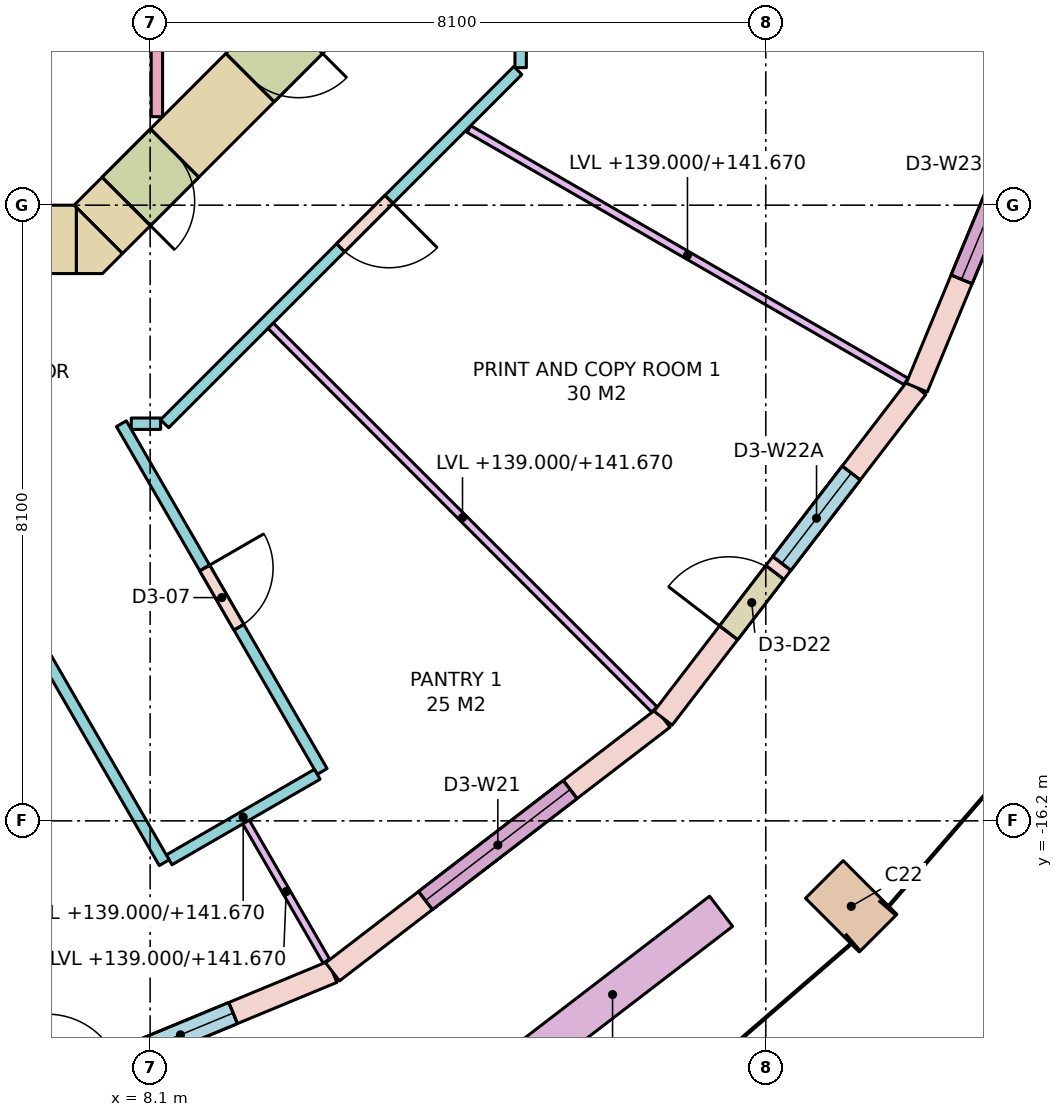
"""IFC4 building model, lengths in metres.
Left out: names, types, materials, properties, quantities, classifications, styles, units other than length and angle.
Written with IfcOpenShell. Run it as: python <this file> out.ifc"""

import sys

from ifc_helpers import new_model, si_unit, direction, frame, frame_2d, origin, origin_2d, place, context, subcontext, project, spatial, polyline, rectangle, outline, extrude, element, fill, save


model = new_model("IFC4")
c1 = context("Model", 3, precision=1e-05, world=origin(), true_north=direction((0.0, 1.0)))
c2 = subcontext(c1, "Body", "Model", "MODEL_VIEW")
j1 = project(units=[si_unit("LENGTHUNIT", "METRE"), si_unit("PLANEANGLEUNIT", "RADIAN")], contexts=[c1])
p1 = place(None, origin())
s1 = spatial("IfcSite", under=j1, at=p1, CompositionType="ELEMENT")
p2 = place(p1, origin())
s2 = spatial("IfcBuilding", under=s1, at=p2, CompositionType="ELEMENT")
p3 = place(p2, frame((0.0, 0.0, 139.0)))
s3 = spatial("IfcBuildingStorey", under=s2, at=p3, CompositionType="ELEMENT", Elevation=139.0)
p4 = place(p3, frame((17.324, -17.324, 0.0), z_axis=(0.0, 0.0, 1.0), x_axis=(0.707106781187, 0.707106781187, 0.0)))
e1 = element("IfcColumn", 1, at=p4, inside=s3, PredefinedType="COLUMN", context=c2, shape_type="SweptSolid", body=[
    extrude(rectangle(XDim=0.7, YDim=1.0, at=origin_2d()), origin(), (0.0, 0.0, 1.0), 3.8),
])
p5 = place(p3, frame((-7.13, -8.55, -0.28), z_axis=(0.0, 0.0, 1.0), x_axis=(1.0, 0.0, 0.0)))
e2 = element("IfcWall", 2, at=p5, inside=s3, PredefinedType="SHEAR", context=c2, shape_type="SweptSolid", body=[
    extrude(rectangle(XDim=14.26, YDim=0.9, at=frame_2d((7.13, 0.0))), origin(), (0.0, 0.0, 1.0), 3.8),
])
p6 = place(p5, frame((8.08, 0.0, 0.28)))
e3 = element("IfcOpeningElement", 3, at=p6, cuts=e2, PredefinedType="OPENING", context=c2, shape_type="SweptSolid", body=[
    extrude(rectangle(XDim=0.7, YDim=2.1, at=frame_2d((0.35, 1.05))), frame((0.0, 0.46, 0.0), z_axis=(0.0, -1.0, 0.0), x_axis=(1.0, 0.0, 0.0)), (0.0, 0.0, 1.0), 0.92),
])
p7 = place(p5, frame((5.58, 0.0, 0.28)))
e4 = element("IfcOpeningElement", 4, at=p7, cuts=e2, PredefinedType="OPENING", context=c2, shape_type="SweptSolid", body=[
    extrude(rectangle(XDim=0.85, YDim=2.1, at=frame_2d((0.425, 1.05))), frame((0.0, 0.46, 0.0), z_axis=(0.0, -1.0, 0.0), x_axis=(1.0, 0.0, 0.0)), (0.0, 0.0, 1.0), 0.92),
])
p8 = place(p5, frame((6.88, 0.0, 0.28)))
e5 = element("IfcOpeningElement", 5, at=p8, cuts=e2, PredefinedType="OPENING", context=c2, shape_type="SweptSolid", body=[
    extrude(rectangle(XDim=0.85, YDim=2.1, at=frame_2d((0.425, 1.05))), frame((0.0, 0.46, 0.0), z_axis=(0.0, -1.0, 0.0), x_axis=(1.0, 0.0, 0.0)), (0.0, 0.0, 1.0), 0.92),
])
p9 = place(p5, frame((9.445, 0.0, 0.28)))
e6 = element("IfcOpeningElement", 6, at=p9, cuts=e2, PredefinedType="OPENING", context=c2, shape_type="SweptSolid", body=[
    extrude(rectangle(XDim=0.9, YDim=2.1, at=frame_2d((0.45, 1.05))), frame((0.0, 0.46, 0.0), z_axis=(0.0, -1.0, 0.0), x_axis=(1.0, 0.0, 0.0)), (0.0, 0.0, 1.0), 0.92),
])
p10 = place(p5, frame((11.431, 0.0, 0.28)))
e7 = element("IfcOpeningElement", 7, at=p10, cuts=e2, PredefinedType="OPENING", context=c2, shape_type="SweptSolid", body=[
    extrude(rectangle(XDim=0.9, YDim=2.1, at=frame_2d((0.45, 1.05))), frame((0.0, 0.46, 0.0), z_axis=(0.0, -1.0, 0.0), x_axis=(1.0, 0.0, 0.0)), (0.0, 0.0, 1.0), 0.92),
])
p11 = place(p3, frame((10.418, -5.418, -0.28), z_axis=(0.0, 0.0, 1.0), x_axis=(-0.707106781187, -0.707106781187, 0.0)))
e8 = element("IfcWall", 8, at=p11, inside=s3, PredefinedType="SHEAR", context=c2, shape_type="SweptSolid", body=[
    extrude(rectangle(XDim=4.243, YDim=0.9, at=frame_2d((2.121, 0.0))), origin(), (0.0, 0.0, 1.0), 3.8),
])
p12 = place(p11, frame((2.823, 0.0, 0.28)))
e9 = element("IfcOpeningElement", 9, at=p12, cuts=e8, PredefinedType="OPENING", context=c2, shape_type="SweptSolid", body=[
    extrude(rectangle(XDim=0.9, YDim=2.1, at=frame_2d((0.45, 1.05))), frame((0.0, 0.46, 0.0), z_axis=(0.0, -1.0, 0.0), x_axis=(1.0, 0.0, 0.0)), (0.0, 0.0, 1.0), 0.92),
])
p13 = place(p11, frame((0.52, 0.0, 0.28)))
e10 = element("IfcOpeningElement", 10, at=p13, cuts=e8, PredefinedType="OPENING", context=c2, shape_type="SweptSolid", body=[
    extrude(rectangle(XDim=0.9, YDim=2.1, at=frame_2d((0.45, 1.05))), frame((0.0, 0.46, 0.0), z_axis=(0.0, -1.0, 0.0), x_axis=(1.0, 0.0, 0.0)), (0.0, 0.0, 1.0), 0.92),
])
p14 = place(p3, frame((0.0, 0.0, -0.28)))
e11 = element("IfcWall", 11, at=p14, inside=s3, PredefinedType="SHEAR", context=c2, shape_type="SweptSolid", body=[
    extrude(outline(polyline([(7.473, -9.0), (7.13, -9.0), (7.13, -8.13), (7.736, -8.736), (7.473, -9.0)])), origin(), (0.0, 0.0, 1.0), 3.8),
])
p15 = place(p3, frame((5.435, -20.284, 0.0), z_axis=(0.0, 0.0, 1.0), x_axis=(0.923877333662, 0.382688740813, 0.0)))
e12 = element("IfcWall", 12, at=p15, inside=s3, PredefinedType="STANDARD", context=c2, shape_type="SweptSolid", body=[
    extrude(rectangle(XDim=5.482, YDim=0.3, at=frame_2d((2.741, 0.0))), origin(), (0.0, 0.0, 1.0), 3.52),
])
p16 = place(p15, frame((1.416, 0.0, 0.0)))
e13 = element("IfcOpeningElement", 13, at=p16, cuts=e12, PredefinedType="OPENING", context=c2, shape_type="SweptSolid", body=[
    extrude(rectangle(XDim=1.0, YDim=2.4, at=frame_2d((0.5, 1.2))), frame((0.0, 0.16, 0.0), z_axis=(0.0, -1.0, 0.0), x_axis=(1.0, 0.0, 0.0)), (0.0, 0.0, 1.0), 0.32),
])
p17 = place(p15, frame((2.566, 0.0, 0.8)))
e14 = element("IfcOpeningElement", 14, at=p17, cuts=e12, PredefinedType="OPENING", context=c2, shape_type="SweptSolid", body=[
    extrude(rectangle(XDim=1.5, YDim=2.5, at=frame_2d((0.75, 1.25))), frame((0.0, 0.16, 0.0), z_axis=(0.0, -1.0, 0.0), x_axis=(1.0, 0.0, 0.0)), (0.0, 0.0, 1.0), 0.32),
])
p18 = place(p3, frame((10.5, -18.187, 0.0), z_axis=(0.0, 0.0, 1.0), x_axis=(0.793335336593, 0.608784891166, 0.0)))
e15 = element("IfcWall", 15, at=p18, inside=s3, PredefinedType="STANDARD", context=c2, shape_type="SweptSolid", body=[
    extrude(rectangle(XDim=5.482, YDim=0.3, at=frame_2d((2.741, 0.0))), origin(), (0.0, 0.0, 1.0), 3.52),
])
p19 = place(p18, frame((1.541, 0.0, 0.8)))
e16 = element("IfcOpeningElement", 16, at=p19, cuts=e15, PredefinedType="OPENING", context=c2, shape_type="SweptSolid", body=[
    extrude(rectangle(XDim=2.4, YDim=2.5, at=frame_2d((1.2, 1.25))), frame((0.0, 0.16, 0.0), z_axis=(0.0, -1.0, 0.0), x_axis=(1.0, 0.0, 0.0)), (0.0, 0.0, 1.0), 0.32),
])
p20 = place(p3, frame((14.849, -14.849, 0.0), z_axis=(0.0, 0.0, 1.0), x_axis=(0.608784891166, 0.793335336593, 0.0)))
e17 = element("IfcWall", 17, at=p20, inside=s3, PredefinedType="STANDARD", context=c2, shape_type="SweptSolid", body=[
    extrude(rectangle(XDim=5.482, YDim=0.3, at=frame_2d((2.741, 0.0))), origin(), (0.0, 0.0, 1.0), 3.52),
])
p21 = place(p20, frame((1.416, 0.0, 0.0)))
e18 = element("IfcOpeningElement", 18, at=p21, cuts=e17, PredefinedType="OPENING", context=c2, shape_type="SweptSolid", body=[
    extrude(rectangle(XDim=1.0, YDim=2.4, at=frame_2d((0.5, 1.2))), frame((0.0, 0.16, 0.0), z_axis=(0.0, -1.0, 0.0), x_axis=(1.0, 0.0, 0.0)), (0.0, 0.0, 1.0), 0.32),
])
p22 = place(p20, frame((2.566, 0.0, 0.8)))
e19 = element("IfcOpeningElement", 19, at=p22, cuts=e17, PredefinedType="OPENING", context=c2, shape_type="SweptSolid", body=[
    extrude(rectangle(XDim=1.5, YDim=2.5, at=frame_2d((0.75, 1.25))), frame((0.0, 0.16, 0.0), z_axis=(0.0, -1.0, 0.0), x_axis=(1.0, 0.0, 0.0)), (0.0, 0.0, 1.0), 0.32),
])
p23 = place(p3, frame((18.187, -10.5, 0.0), z_axis=(0.0, 0.0, 1.0), x_axis=(0.382688740813, 0.923877333662, 0.0)))
e20 = element("IfcWall", 20, at=p23, inside=s3, PredefinedType="STANDARD", context=c2, shape_type="SweptSolid", body=[
    extrude(rectangle(XDim=5.482, YDim=0.3, at=frame_2d((2.741, 0.0))), origin(), (0.0, 0.0, 1.0), 3.52),
])
p24 = place(p23, frame((1.541, 0.0, 0.8)))
e21 = element("IfcOpeningElement", 21, at=p24, cuts=e20, PredefinedType="OPENING", context=c2, shape_type="SweptSolid", body=[
    extrude(rectangle(XDim=2.4, YDim=2.5, at=frame_2d((1.2, 1.25))), frame((0.0, 0.16, 0.0), z_axis=(0.0, -1.0, 0.0), x_axis=(1.0, 0.0, 0.0)), (0.0, 0.0, 1.0), 0.32),
])
p25 = place(p3, frame((12.756, -19.581, 0.0), z_axis=(0.0, 0.0, 1.0), x_axis=(0.793384730612, 0.608720518162, 0.0)))
e22 = element("IfcWall", 22, at=p25, inside=s3, PredefinedType="PARAPET", context=c2, shape_type="SweptSolid", body=[
    extrude(rectangle(XDim=3.6, YDim=0.5, at=frame_2d((1.8, 0.0))), origin(), (0.0, 0.0, 1.0), 0.9),
])
p26 = place(p3, frame((8.189, -6.936, 0.0), z_axis=(0.0, 0.0, 1.0), x_axis=(0.0, 1.0, 0.0)))
e23 = element("IfcWall", 23, at=p26, inside=s3, PredefinedType="PARTITIONING", context=c2, shape_type="SweptSolid", body=[
    extrude(rectangle(XDim=2.436, YDim=0.15, at=frame_2d((1.218, 0.0))), origin(), (0.0, 0.0, 1.0), 3.52),
])
p27 = place(p3, frame((12.975, 6.105, 0.0), z_axis=(0.0, 0.0, 1.0), x_axis=(0.0, -1.0, 0.0)))
e24 = element("IfcWall", 24, at=p27, inside=s3, PredefinedType="PARTITIONING", context=c2, shape_type="SweptSolid", body=[
    extrude(rectangle(XDim=12.396, YDim=0.15, at=frame_2d((6.198, 0.0))), origin(), (0.0, 0.0, 1.0), 2.67),
])
p28 = place(p27, frame((5.298, 0.0, 0.0)))
e25 = element("IfcOpeningElement", 25, at=p28, cuts=e24, PredefinedType="OPENING", context=c2, shape_type="SweptSolid", body=[
    extrude(rectangle(XDim=1.8, YDim=2.1, at=frame_2d((0.9, 1.05))), frame((0.0, 0.085, 0.0), z_axis=(0.0, -1.0, 0.0), x_axis=(1.0, 0.0, 0.0)), (0.0, 0.0, 1.0), 0.17),
])
p29 = place(p3, frame((12.938, -6.328, 0.0), z_axis=(0.0, 0.0, 1.0), x_axis=(-0.707088206597, -0.707125355289, 0.0)))
e26 = element("IfcWall", 26, at=p29, inside=s3, PredefinedType="PARTITIONING", context=c2, shape_type="SweptSolid", body=[
    extrude(rectangle(XDim=6.572, YDim=0.15, at=frame_2d((3.286, 0.0))), origin(), (0.0, 0.0, 1.0), 2.67),
])
p30 = place(p29, frame((2.398, 0.0, 0.0)))
e27 = element("IfcOpeningElement", 27, at=p30, cuts=e26, PredefinedType="OPENING", context=c2, shape_type="SweptSolid", body=[
    extrude(rectangle(XDim=0.9, YDim=2.1, at=frame_2d((0.45, 1.05))), frame((0.0, 0.085, 0.0), z_axis=(0.0, -1.0, 0.0), x_axis=(1.0, 0.0, 0.0)), (0.0, 0.0, 1.0), 0.17),
])
p31 = place(p3, frame((8.238, -10.975, 0.0), z_axis=(0.0, 0.0, 1.0), x_axis=(-1.0, 0.0, 0.0)))
e28 = element("IfcWall", 28, at=p31, inside=s3, PredefinedType="PARTITIONING", context=c2, shape_type="SweptSolid", body=[
    extrude(rectangle(XDim=0.386, YDim=0.15, at=frame_2d((0.193, 0.0))), origin(), (0.0, 0.0, 1.0), 3.52),
])
p32 = place(p3, frame((7.722, -10.975, 0.0), z_axis=(0.0, 0.0, 1.0), x_axis=(0.499981143329, -0.866036290415, 0.0)))
e29 = element("IfcWall", 29, at=p32, inside=s3, PredefinedType="PARTITIONING", context=c2, shape_type="SweptSolid", body=[
    extrude(rectangle(XDim=5.283, YDim=0.15, at=frame_2d((2.642, 0.0))), origin(), (0.0, 0.0, 1.0), 3.52),
])
p33 = place(p32, frame((2.191, 0.0, 0.0)))
e30 = element("IfcOpeningElement", 30, at=p33, cuts=e29, PredefinedType="OPENING", context=c2, shape_type="SweptSolid", body=[
    extrude(rectangle(XDim=0.9, YDim=2.1, at=frame_2d((0.45, 1.05))), frame((0.0, 0.085, 0.0), z_axis=(0.0, -1.0, 0.0), x_axis=(1.0, 0.0, 0.0)), (0.0, 0.0, 1.0), 0.17),
])
p34 = place(p3, frame((10.299, -15.588, 0.0), z_axis=(0.0, 0.0, 1.0), x_axis=(-0.866017533419, -0.500013631625, 0.0)))
e31 = element("IfcWall", 31, at=p34, inside=s3, PredefinedType="PARTITIONING", context=c2, shape_type="SweptSolid", body=[
    extrude(rectangle(XDim=2.25, YDim=0.15, at=frame_2d((1.125, 0.0))), origin(), (0.0, 0.0, 1.0), 2.67),
])
p35 = place(p3, frame((8.285, -16.75, 0.0), z_axis=(0.0, 0.0, 1.0), x_axis=(-0.499988075443, 0.866032288321, 0.0)))
e32 = element("IfcWall", 32, at=p35, inside=s3, PredefinedType="PARTITIONING", context=c2, shape_type="SweptSolid", body=[
    extrude(rectangle(XDim=6.604, YDim=0.15, at=frame_2d((3.302, 0.0))), origin(), (0.0, 0.0, 1.0), 3.52),
])
p36 = place(p3, frame((9.362, -16.215, 0.0), z_axis=(0.0, 0.0, 1.0), x_axis=(0.500015802937, -0.866016279763, 0.0)))
e33 = element("IfcWall", 33, at=p36, inside=s3, PredefinedType="PARTITIONING", context=c2, shape_type="SweptSolid", body=[
    extrude(rectangle(XDim=2.113, YDim=0.1, at=frame_2d((1.057, 0.0))), origin(), (0.0, 0.0, 1.0), 2.67),
])
p37 = place(p3, frame((9.686, -9.686, 0.0), z_axis=(0.0, 0.0, 1.0), x_axis=(0.707106781187, -0.707106781187, 0.0)))
e34 = element("IfcWall", 34, at=p37, inside=s3, PredefinedType="PARTITIONING", context=c2, shape_type="SweptSolid", body=[
    extrude(rectangle(XDim=7.139, YDim=0.1, at=frame_2d((3.569, 0.0))), origin(), (0.0, 0.0, 1.0), 2.67),
])
p38 = place(p3, frame((12.294, -7.098, 0.0), z_axis=(0.0, 0.0, 1.0), x_axis=(0.866010486135, -0.500025837236, 0.0)))
e35 = element("IfcWall", 35, at=p38, inside=s3, PredefinedType="PARTITIONING", context=c2, shape_type="SweptSolid", body=[
    extrude(rectangle(XDim=6.641, YDim=0.1, at=frame_2d((3.32, 0.0))), origin(), (0.0, 0.0, 1.0), 2.67),
])
p39 = place(p17, origin())
e36 = element("IfcWindow", 36, at=p39, inside=s3, PartitioningType="SINGLE_PANEL", PredefinedType="WINDOW", context=c2, shape_type="SweptSolid", body=[
    extrude(rectangle(XDim=1.5, YDim=2.5, at=frame_2d((0.75, 1.25))), frame((0.0, 0.03, 0.0), z_axis=(0.0, -1.0, 0.0), x_axis=(1.0, 0.0, 0.0)), (0.0, 0.0, 1.0), 0.06),
])
fill(e14, e36)
p40 = place(p19, origin())
e37 = element("IfcWindow", 37, at=p40, inside=s3, PartitioningType="SINGLE_PANEL", PredefinedType="WINDOW", context=c2, shape_type="SweptSolid", body=[
    extrude(rectangle(XDim=2.4, YDim=2.5, at=frame_2d((1.2, 1.25))), frame((0.0, 0.03, 0.0), z_axis=(0.0, -1.0, 0.0), x_axis=(1.0, 0.0, 0.0)), (0.0, 0.0, 1.0), 0.06),
])
fill(e16, e37)
p41 = place(p21, origin())
e38 = element("IfcDoor", 38, at=p41, inside=s3, OperationType="SINGLE_SWING_LEFT", PredefinedType="DOOR", context=c2, shape_type="SweptSolid", body=[
    extrude(rectangle(XDim=1.0, YDim=2.4, at=frame_2d((0.5, 1.2))), frame((0.0, 0.025, 0.0), z_axis=(0.0, -1.0, 0.0), x_axis=(1.0, 0.0, 0.0)), (0.0, 0.0, 1.0), 0.05),
])
fill(e18, e38)
p42 = place(p22, origin())
e39 = element("IfcWindow", 39, at=p42, inside=s3, PartitioningType="SINGLE_PANEL", PredefinedType="WINDOW", context=c2, shape_type="SweptSolid", body=[
    extrude(rectangle(XDim=1.5, YDim=2.5, at=frame_2d((0.75, 1.25))), frame((0.0, 0.03, 0.0), z_axis=(0.0, -1.0, 0.0), x_axis=(1.0, 0.0, 0.0)), (0.0, 0.0, 1.0), 0.06),
])
fill(e19, e39)
p43 = place(p24, origin())
e40 = element("IfcWindow", 40, at=p43, inside=s3, PartitioningType="SINGLE_PANEL", PredefinedType="WINDOW", context=c2, shape_type="SweptSolid", body=[
    extrude(rectangle(XDim=2.4, YDim=2.5, at=frame_2d((1.2, 1.25))), frame((0.0, 0.03, 0.0), z_axis=(0.0, -1.0, 0.0), x_axis=(1.0, 0.0, 0.0)), (0.0, 0.0, 1.0), 0.06),
])
fill(e21, e40)
p44 = place(p12, origin())
e41 = element("IfcDoor", 41, at=p44, inside=s3, OperationType="SINGLE_SWING_RIGHT", PredefinedType="DOOR", context=c2, shape_type="SweptSolid", body=[
    extrude(rectangle(XDim=0.9, YDim=2.1, at=frame_2d((0.45, 1.05))), frame((0.0, 0.025, 0.0), z_axis=(0.0, -1.0, 0.0), x_axis=(1.0, 0.0, 0.0)), (0.0, 0.0, 1.0), 0.05),
])
fill(e9, e41)
p45 = place(p13, origin())
e42 = element("IfcDoor", 42, at=p45, inside=s3, OperationType="SINGLE_SWING_LEFT", PredefinedType="DOOR", context=c2, shape_type="SweptSolid", body=[
    extrude(rectangle(XDim=0.9, YDim=2.1, at=frame_2d((0.45, 1.05))), frame((0.0, 0.025, 0.0), z_axis=(0.0, -1.0, 0.0), x_axis=(1.0, 0.0, 0.0)), (0.0, 0.0, 1.0), 0.05),
])
fill(e10, e42)
p46 = place(p33, origin())
e43 = element("IfcDoor", 43, at=p46, inside=s3, OperationType="SINGLE_SWING_LEFT", PredefinedType="DOOR", context=c2, shape_type="SweptSolid", body=[
    extrude(rectangle(XDim=0.9, YDim=2.1, at=frame_2d((0.45, 1.05))), frame((0.0, 0.025, 0.0), z_axis=(0.0, -1.0, 0.0), x_axis=(1.0, 0.0, 0.0)), (0.0, 0.0, 1.0), 0.05),
])
fill(e30, e43)
p47 = place(p30, origin())
e44 = element("IfcDoor", 44, at=p47, inside=s3, OperationType="SINGLE_SWING_LEFT", PredefinedType="DOOR", context=c2, shape_type="SweptSolid", body=[
    extrude(rectangle(XDim=0.9, YDim=2.1, at=frame_2d((0.45, 1.05))), frame((0.0, 0.025, 0.0), z_axis=(0.0, -1.0, 0.0), x_axis=(1.0, 0.0, 0.0)), (0.0, 0.0, 1.0), 0.05),
])
fill(e27, e44)
save(model, sys.argv[1])
